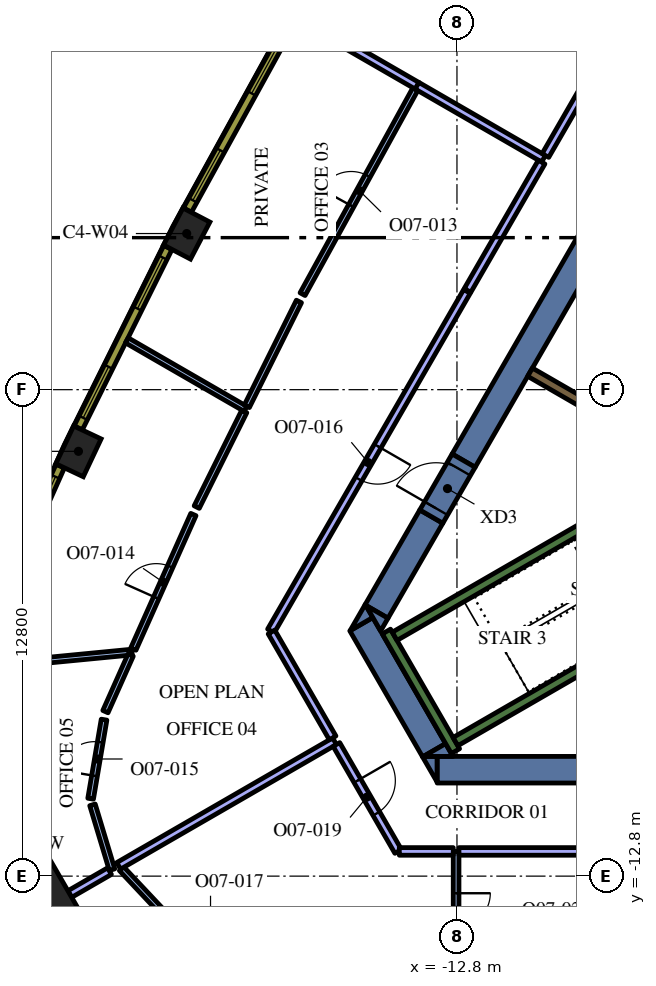
"""IFC4 building model, lengths in metres.
Left out: names, types, materials, properties, quantities, classifications, styles, units other than length and angle.
Written with IfcOpenShell. Run it as: python <this file> out.ifc"""

import sys

from ifc_helpers import new_model, si_unit, direction, frame, frame_2d, origin, origin_2d, place, context, subcontext, project, spatial, polyline, rectangle, outline, extrude, element, fill, save


model = new_model("IFC4")
c1 = context("Model", 3, precision=1e-05, world=origin(), true_north=direction((0.0, 1.0)))
c2 = subcontext(c1, "Body", "Model", "MODEL_VIEW")
j1 = project(units=[si_unit("LENGTHUNIT", "METRE"), si_unit("PLANEANGLEUNIT", "RADIAN")], contexts=[c1])
p1 = place(None, origin())
s1 = spatial("IfcSite", under=j1, at=p1, CompositionType="ELEMENT")
p2 = place(p1, origin())
s2 = spatial("IfcBuilding", under=s1, at=p2, CompositionType="ELEMENT")
p3 = place(p2, frame((0.0, 0.0, 218.4)))
s3 = spatial("IfcBuildingStorey", under=s2, at=p3, CompositionType="ELEMENT", Elevation=218.4)
p4 = place(p3, frame((-24.027, -13.872, 0.0), z_axis=(0.0, 0.0, 1.0), x_axis=(-0.866025403784, -0.5, 0.0)))
e1 = element("IfcColumn", 1, at=p4, inside=s3, PredefinedType="COLUMN", context=c2, shape_type="SweptSolid", body=[
    extrude(rectangle(XDim=2.4, YDim=2.4, at=origin_2d()), origin(), (0.0, 0.0, 1.0), 4.2),
])
for number, where, z_axis, x_axis in (
    (2, (-19.912, 4.108, 0.0), (0.0, 0.0, 1.0), (-0.464, -0.886, 0.0)),
    (3, (-22.76, -1.623, 0.0), (0.0, 0.0, 1.0), (-0.426, -0.905, 0.0)),
):
    element("IfcColumn", number, at=place(p3, frame(where, z_axis=z_axis, x_axis=x_axis)), inside=s3, PredefinedType="COLUMN", context=c2, shape_type="SweptSolid", body=[
        extrude(rectangle(XDim=1.1, YDim=0.8, at=origin_2d()), origin(), (0.0, 0.0, 1.0), 4.2),
    ])
p5 = place(p3, frame((8.904, -10.0, 0.0), z_axis=(0.0, 0.0, 1.0), x_axis=(-1.0, 0.0, 0.0)))
e4 = element("IfcWall", 4, at=p5, inside=s3, PredefinedType="SOLIDWALL", context=c2, shape_type="SweptSolid", body=[
    extrude(rectangle(XDim=22.226, YDim=0.7, at=frame_2d((11.113, 0.0))), origin(), (0.0, 0.0, 1.0), 4.2),
])
p6 = place(p3, origin())
e5 = element("IfcWall", 5, at=p6, inside=s3, PredefinedType="SOLIDWALL", context=c2, shape_type="SweptSolid", body=[
    extrude(outline(polyline([(-13.712, -9.65), (-13.324, -9.65), (-13.324, -10.322), (-13.712, -9.65)])), origin(), (0.0, 0.0, 1.0), 4.2),
])
p7 = place(p3, frame((-13.402, -9.487, 0.0), z_axis=(0.0, 0.0, 1.0), x_axis=(-0.500020498207, 0.866013568815, 0.0)))
e6 = element("IfcWall", 6, at=p7, inside=s3, PredefinedType="SOLIDWALL", context=c2, shape_type="SweptSolid", body=[
    extrude(rectangle(XDim=3.829, YDim=0.7, at=frame_2d((1.915, 0.0))), origin(), (0.0, 0.0, 1.0), 4.2),
])
e7 = element("IfcWall", 7, at=p6, inside=s3, PredefinedType="SOLIDWALL", context=c2, shape_type="SweptSolid", body=[
    extrude(outline(polyline([(-15.014, -5.995), (-15.611, -6.339), (-15.213, -5.65), (-15.014, -5.995)])), origin(), (0.0, 0.0, 1.0), 4.2),
])
e8 = element("IfcWall", 8, at=p6, inside=s3, PredefinedType="SOLIDWALL", context=c2, shape_type="SweptSolid", body=[
    extrude(outline(polyline([(-12.904, -9.65), (-13.68, -9.65), (-13.098, -9.314), (-12.904, -9.65)])), origin(), (0.0, 0.0, 1.0), 4.2),
])
p8 = place(p3, frame((-13.475, -3.339, 0.0), z_axis=(0.0, 0.0, 1.0), x_axis=(-0.499944726303, -0.866057313716, 0.0)))
e9 = element("IfcWall", 9, at=p8, inside=s3, PredefinedType="SOLIDWALL", context=c2, shape_type="SweptSolid", body=[
    extrude(rectangle(XDim=2.884, YDim=0.7, at=frame_2d((1.442, 0.0))), origin(), (0.0, 0.0, 1.0), 4.2),
])
e10 = element("IfcWall", 10, at=p6, inside=s3, PredefinedType="SOLIDWALL", context=c2, shape_type="SweptSolid", body=[
    extrude(outline(polyline([(-14.809, -6.35), (-15.197, -5.678), (-14.615, -6.014), (-14.809, -6.35)])), origin(), (0.0, 0.0, 1.0), 4.2),
])
p9 = place(p3, frame((-12.625, -1.867, 0.0), z_axis=(0.0, 0.0, 1.0), x_axis=(0.500008520515, 0.866020484407, 0.0)))
e11 = element("IfcWall", 11, at=p9, inside=s3, PredefinedType="SOLIDWALL", context=c2, shape_type="SweptSolid", body=[
    extrude(rectangle(XDim=15.859, YDim=0.7, at=frame_2d((7.929, 0.0))), origin(), (0.0, 0.0, 1.0), 4.2),
])
p10 = place(p3, frame((-12.84, -9.511, 0.0), z_axis=(0.0, 0.0, 1.0), x_axis=(-0.499997733992, 0.866026712061, 0.0)))
e12 = element("IfcWall", 12, at=p10, inside=s3, PredefinedType="SOLIDWALL", context=c2, shape_type="SweptSolid", body=[
    extrude(rectangle(XDim=3.634, YDim=0.25, at=frame_2d((1.817, 0.0))), origin(), (0.0, 0.0, 1.0), 4.2),
])
p11 = place(p3, frame((-14.44, -6.49, 0.0), z_axis=(0.0, 0.0, 1.0), x_axis=(0.866022966069, 0.500004222222, 0.0)))
e13 = element("IfcWall", 13, at=p11, inside=s3, PredefinedType="SOLIDWALL", context=c2, shape_type="SweptSolid", body=[
    extrude(rectangle(XDim=6.8, YDim=0.25, at=frame_2d((3.4, 0.0))), origin(), (0.0, 0.0, 1.0), 4.2),
])
p12 = place(p3, frame((-12.84, -9.261, 0.0), z_axis=(0.0, 0.0, 1.0), x_axis=(0.866016039709, 0.500016218704, 0.0)))
e14 = element("IfcWall", 14, at=p12, inside=s3, PredefinedType="SOLIDWALL", context=c2, shape_type="SweptSolid", body=[
    extrude(rectangle(XDim=7.05, YDim=0.25, at=frame_2d((3.525, 0.0))), origin(), (0.0, 0.0, 1.0), 4.2),
])
p13 = place(p3, frame((-8.106, -1.14, 0.0), z_axis=(0.0, 0.0, 1.0), x_axis=(-0.866008981251, 0.500028443584, 0.0)))
e15 = element("IfcWall", 15, at=p13, inside=s3, PredefinedType="SOLIDWALL", context=c2, shape_type="SweptSolid", body=[
    extrude(rectangle(XDim=3.2, YDim=0.25, at=frame_2d((1.6, 0.0))), origin(), (0.0, 0.0, 1.0), 4.2),
])
p14 = place(p3, frame((-13.475, -3.339, 0.0), z_axis=(0.0, 0.0, 1.0), x_axis=(0.499954529098, 0.86605165483, 0.0)))
e16 = element("IfcWall", 16, at=p14, inside=s3, PredefinedType="SOLIDWALL", context=c2, shape_type="SweptSolid", body=[
    extrude(rectangle(XDim=1.7, YDim=0.7, at=frame_2d((0.85, 0.0))), origin(), (0.0, 0.0, 1.0), 4.2),
])
p15 = place(p14, frame((0.25, 0.0, 0.0)))
e17 = element("IfcOpeningElement", 17, at=p15, cuts=e16, PredefinedType="OPENING", context=c2, shape_type="SweptSolid", body=[
    extrude(rectangle(XDim=1.2, YDim=2.1, at=frame_2d((0.6, 1.05))), frame((0.0, 0.36, 0.0), z_axis=(0.0, -1.0, 0.0), x_axis=(1.0, 0.0, 0.0)), (0.0, 0.0, 1.0), 0.72),
])
p16 = place(p3, frame((-13.844, 7.993, 0.0), z_axis=(0.0, 0.0, 1.0), x_axis=(-0.866003976688, 0.500037110984, 0.0)))
e18 = element("IfcWall", 18, at=p16, inside=s3, PredefinedType="PARTITIONING", context=c2, shape_type="SweptSolid", body=[
    extrude(rectangle(XDim=3.045, YDim=0.2, at=frame_2d((1.522, 0.0))), origin(), (0.0, 0.0, 1.0), 3.45),
])
p17 = place(p3, frame((-10.522, 6.075, 0.0), z_axis=(0.0, 0.0, 1.0), x_axis=(-0.866002601515, 0.500039492609, 0.0)))
e19 = element("IfcWall", 19, at=p17, inside=s3, PredefinedType="PARTITIONING", context=c2, shape_type="SweptSolid", body=[
    extrude(rectangle(XDim=3.844, YDim=0.2, at=frame_2d((1.922, 0.0))), origin(), (0.0, 0.0, 1.0), 3.45),
])
p18 = place(p3, frame((-8.522, 9.539, 0.0), z_axis=(0.0, 0.0, 1.0), x_axis=(-0.499997012787, -0.866027128446, 0.0)))
e20 = element("IfcWall", 20, at=p18, inside=s3, PredefinedType="PARTITIONING", context=c2, shape_type="SweptSolid", body=[
    extrude(rectangle(XDim=3.9, YDim=0.2, at=frame_2d((1.95, 0.0))), origin(), (0.0, 0.0, 1.0), 3.45),
])
p19 = place(p3, frame((-18.363, -0.506, 0.0), z_axis=(0.0, 0.0, 1.0), x_axis=(-0.866048087663, 0.499960708312, 0.0)))
e21 = element("IfcWall", 21, at=p19, inside=s3, PredefinedType="PARTITIONING", context=c2, shape_type="SweptSolid", body=[
    extrude(rectangle(XDim=3.607, YDim=0.15, at=frame_2d((1.804, 0.0))), origin(), (0.0, 0.0, 1.0), 3.45),
])
p20 = place(p3, frame((-16.863, 2.513, 0.0), z_axis=(0.0, 0.0, 1.0), x_axis=(0.48192483879, 0.876212559689, 0.0)))
e22 = element("IfcWall", 22, at=p20, inside=s3, PredefinedType="PARTITIONING", context=c2, shape_type="SweptSolid", body=[
    extrude(rectangle(XDim=6.157, YDim=0.15, at=frame_2d((3.078, 0.0))), origin(), (0.0, 0.0, 1.0), 3.45),
])
p21 = place(p20, frame((2.657, 0.0, 0.0)))
e23 = element("IfcOpeningElement", 23, at=p21, cuts=e22, PredefinedType="OPENING", context=c2, shape_type="SweptSolid", body=[
    extrude(rectangle(XDim=0.9, YDim=2.1, at=frame_2d((0.45, 1.05))), frame((0.0, 0.085, 0.0), z_axis=(0.0, -1.0, 0.0), x_axis=(1.0, 0.0, 0.0)), (0.0, 0.0, 1.0), 0.17),
])
p22 = place(p3, frame((-16.958, 2.321, 0.0), z_axis=(0.0, 0.0, 1.0), x_axis=(-0.445184199442, -0.895439014432, 0.0)))
e24 = element("IfcWall", 24, at=p22, inside=s3, PredefinedType="PARTITIONING", context=c2, shape_type="SweptSolid", body=[
    extrude(rectangle(XDim=3.082, YDim=0.15, at=frame_2d((1.541, 0.0))), origin(), (0.0, 0.0, 1.0), 3.45),
])
p23 = place(p3, frame((-21.351, -6.904, 0.0), z_axis=(0.0, 0.0, 1.0), x_axis=(-0.995356631468, -0.096255785242, 0.0)))
e25 = element("IfcWall", 25, at=p23, inside=s3, PredefinedType="PARTITIONING", context=c2, shape_type="SweptSolid", body=[
    extrude(rectangle(XDim=3.536, YDim=0.15, at=frame_2d((1.768, 0.0))), origin(), (0.0, 0.0, 1.0), 3.45),
])
p24 = place(p3, frame((-18.397, -0.573, 0.0), z_axis=(0.0, 0.0, 1.0), x_axis=(-0.445162501923, -0.89544980143, 0.0)))
e26 = element("IfcWall", 26, at=p24, inside=s3, PredefinedType="PARTITIONING", context=c2, shape_type="SweptSolid", body=[
    extrude(rectangle(XDim=2.811, YDim=0.15, at=frame_2d((1.405, 0.0))), origin(), (0.0, 0.0, 1.0), 3.45),
])
p25 = place(p3, frame((-21.316, -6.826, 0.0), z_axis=(0.0, 0.0, 1.0), x_axis=(0.407639588163, 0.913142905663, 0.0)))
e27 = element("IfcWall", 27, at=p25, inside=s3, PredefinedType="PARTITIONING", context=c2, shape_type="SweptSolid", body=[
    extrude(rectangle(XDim=3.877, YDim=0.15, at=frame_2d((1.938, 0.0))), origin(), (0.0, 0.0, 1.0), 3.45),
])
p26 = place(p25, frame((1.477, 0.0, 0.0)))
e28 = element("IfcOpeningElement", 28, at=p26, cuts=e27, PredefinedType="OPENING", context=c2, shape_type="SweptSolid", body=[
    extrude(rectangle(XDim=0.9, YDim=2.1, at=frame_2d((0.45, 1.05))), frame((0.0, 0.085, 0.0), z_axis=(0.0, -1.0, 0.0), x_axis=(1.0, 0.0, 0.0)), (0.0, 0.0, 1.0), 0.17),
])
p27 = place(p3, frame((-21.386, -6.983, 0.0), z_axis=(0.0, 0.0, 1.0), x_axis=(-0.407597309494, -0.91316177827, 0.0)))
e29 = element("IfcWall", 29, at=p27, inside=s3, PredefinedType="PARTITIONING", context=c2, shape_type="SweptSolid", body=[
    extrude(rectangle(XDim=1.63, YDim=0.15, at=frame_2d((0.815, 0.0))), origin(), (0.0, 0.0, 1.0), 3.45),
])
p28 = place(p3, frame((-22.44, -10.763, 0.0), z_axis=(0.0, 0.0, 1.0), x_axis=(0.167682096872, 0.985841120257, 0.0)))
e30 = element("IfcWall", 30, at=p28, inside=s3, PredefinedType="PARTITIONING", context=c2, shape_type="SweptSolid", body=[
    extrude(rectangle(XDim=2.11, YDim=0.15, at=frame_2d((1.055, 0.0))), origin(), (0.0, 0.0, 1.0), 3.45),
])
p29 = place(p28, frame((0.61, 0.0, 0.0)))
e31 = element("IfcOpeningElement", 31, at=p29, cuts=e30, PredefinedType="OPENING", context=c2, shape_type="SweptSolid", body=[
    extrude(rectangle(XDim=0.9, YDim=2.1, at=frame_2d((0.45, 1.05))), frame((0.0, 0.085, 0.0), z_axis=(0.0, -1.0, 0.0), x_axis=(1.0, 0.0, 0.0)), (0.0, 0.0, 1.0), 0.17),
])
p30 = place(p3, frame((-22.391, -10.924, 0.0), z_axis=(0.0, 0.0, 1.0), x_axis=(0.288642134652, -0.957437056993, 0.0)))
e32 = element("IfcWall", 32, at=p30, inside=s3, PredefinedType="PARTITIONING", context=c2, shape_type="SweptSolid", body=[
    extrude(rectangle(XDim=1.782, YDim=0.15, at=frame_2d((0.891, 0.0))), origin(), (0.0, 0.0, 1.0), 3.45),
])
p31 = place(p3, frame((-21.943, -12.669, 0.0), z_axis=(0.0, 0.0, 1.0), x_axis=(-0.866030586491, -0.499991023182, 0.0)))
e33 = element("IfcWall", 33, at=p31, inside=s3, PredefinedType="PARTITIONING", context=c2, shape_type="SweptSolid", body=[
    extrude(rectangle(XDim=1.207, YDim=0.2, at=frame_2d((0.603, 0.0))), origin(), (0.0, 0.0, 1.0), 3.45),
])
p32 = place(p3, frame((-16.021, -9.25, 0.0), z_axis=(0.0, 0.0, 1.0), x_axis=(-0.866021955858, -0.500005971936, 0.0)))
e34 = element("IfcWall", 34, at=p32, inside=s3, PredefinedType="PARTITIONING", context=c2, shape_type="SweptSolid", body=[
    extrude(rectangle(XDim=6.56, YDim=0.2, at=frame_2d((3.28, 0.0))), origin(), (0.0, 0.0, 1.0), 3.45),
])
p33 = place(p3, frame((-10.572, 5.988, 0.0), z_axis=(0.0, 0.0, 1.0), x_axis=(-0.499997012787, -0.866027128446, 0.0)))
e35 = element("IfcWall", 35, at=p33, inside=s3, PredefinedType="PARTITIONING", context=c2, shape_type="SweptSolid", body=[
    extrude(rectangle(XDim=3.9, YDim=0.2, at=frame_2d((1.95, 0.0))), origin(), (0.0, 0.0, 1.0), 3.45),
])
p34 = place(p3, frame((-12.537, 2.585, 0.0), z_axis=(0.0, 0.0, 1.0), x_axis=(-0.500002393198, -0.866024022066, 0.0)))
e36 = element("IfcWall", 36, at=p34, inside=s3, PredefinedType="PARTITIONING", context=c2, shape_type="SweptSolid", body=[
    extrude(rectangle(XDim=10.317, YDim=0.2, at=frame_2d((5.159, 0.0))), origin(), (0.0, 0.0, 1.0), 3.45),
])
p35 = place(p34, frame((4.7, 0.0, 0.0)))
e37 = element("IfcOpeningElement", 37, at=p35, cuts=e36, PredefinedType="OPENING", context=c2, shape_type="SweptSolid", body=[
    extrude(rectangle(XDim=1.0, YDim=2.1, at=frame_2d((0.5, 1.05))), frame((0.0, 0.11, 0.0), z_axis=(0.0, -1.0, 0.0), x_axis=(1.0, 0.0, 0.0)), (0.0, 0.0, 1.0), 0.22),
])
p36 = place(p3, frame((-17.681, -6.376, 0.0), z_axis=(0.0, 0.0, 1.0), x_axis=(0.500022299258, -0.866012528919, 0.0)))
e38 = element("IfcWall", 38, at=p36, inside=s3, PredefinedType="PARTITIONING", context=c2, shape_type="SweptSolid", body=[
    extrude(rectangle(XDim=3.219, YDim=0.2, at=frame_2d((1.609, 0.0))), origin(), (0.0, 0.0, 1.0), 3.45),
])
p37 = place(p3, frame((-21.628, -12.603, 0.0), z_axis=(0.0, 0.0, 1.0), x_axis=(0.684778496912, -0.728751267695, 0.0)))
e39 = element("IfcWall", 39, at=p37, inside=s3, PredefinedType="PARTITIONING", context=c2, shape_type="SweptSolid", body=[
    extrude(rectangle(XDim=1.754, YDim=0.15, at=frame_2d((0.877, 0.0))), origin(), (0.0, 0.0, 1.0), 3.45),
])
p38 = place(p3, frame((-12.823, -12.15, 0.0), z_axis=(0.0, 0.0, 1.0), x_axis=(0.0, -1.0, 0.0)))
e40 = element("IfcWall", 40, at=p38, inside=s3, PredefinedType="PARTITIONING", context=c2, shape_type="SweptSolid", body=[
    extrude(rectangle(XDim=3.011, YDim=0.15, at=frame_2d((1.505, 0.0))), origin(), (0.0, 0.0, 1.0), 3.45),
])
p39 = place(p38, frame((1.1, 0.0, 0.0)))
e41 = element("IfcOpeningElement", 41, at=p39, cuts=e40, PredefinedType="OPENING", context=c2, shape_type="SweptSolid", body=[
    extrude(rectangle(XDim=0.9, YDim=2.1, at=frame_2d((0.45, 1.05))), frame((0.0, 0.085, 0.0), z_axis=(0.0, -1.0, 0.0), x_axis=(1.0, 0.0, 0.0)), (0.0, 0.0, 1.0), 0.17),
])
p40 = place(p3, frame((-15.971, -9.337, 0.0), z_axis=(0.0, 0.0, 1.0), x_axis=(0.500010870188, -0.866019127788, 0.0)))
e42 = element("IfcWall", 42, at=p40, inside=s3, PredefinedType="PARTITIONING", context=c2, shape_type="SweptSolid", body=[
    extrude(rectangle(XDim=3.249, YDim=0.2, at=frame_2d((1.624, 0.0))), origin(), (0.0, 0.0, 1.0), 3.45),
])
p41 = place(p40, frame((1.1, 0.0, 0.0)))
e43 = element("IfcOpeningElement", 43, at=p41, cuts=e42, PredefinedType="OPENING", context=c2, shape_type="SweptSolid", body=[
    extrude(rectangle(XDim=1.0, YDim=2.1, at=frame_2d((0.5, 1.05))), frame((0.0, 0.11, 0.0), z_axis=(0.0, -1.0, 0.0), x_axis=(1.0, 0.0, 0.0)), (0.0, 0.0, 1.0), 0.22),
])
p42 = place(p3, frame((-14.317, -12.15, 0.0), z_axis=(0.0, 0.0, 1.0), x_axis=(1.0, 0.0, 0.0)))
e44 = element("IfcWall", 44, at=p42, inside=s3, PredefinedType="PARTITIONING", context=c2, shape_type="SweptSolid", body=[
    extrude(rectangle(XDim=1.419, YDim=0.2, at=frame_2d((0.71, 0.0))), origin(), (0.0, 0.0, 1.0), 3.45),
])
p43 = place(p3, frame((-12.748, -12.15, 0.0), z_axis=(0.0, 0.0, 1.0), x_axis=(1.0, 0.0, 0.0)))
e45 = element("IfcWall", 45, at=p43, inside=s3, PredefinedType="PARTITIONING", context=c2, shape_type="SweptSolid", body=[
    extrude(rectangle(XDim=8.718, YDim=0.2, at=frame_2d((4.359, 0.0))), origin(), (0.0, 0.0, 1.0), 3.45),
])
p44 = place(p3, frame((-17.338, 9.368, 0.0), z_axis=(0.0, 0.0, 1.0), x_axis=(-0.481925825015, -0.876212017256, 0.0)))
e46 = element("IfcWall", 46, at=p44, inside=s3, PredefinedType="SOLIDWALL", context=c2, shape_type="SweptSolid", body=[
    extrude(rectangle(XDim=5.299, YDim=0.24, at=frame_2d((2.649, 0.0))), origin(), (0.0, 0.0, 1.0), 3.95),
])
p45 = place(p44, frame((0.295, 0.0, 0.9)))
e47 = element("IfcOpeningElement", 47, at=p45, cuts=e46, PredefinedType="OPENING", context=c2, shape_type="SweptSolid", body=[
    extrude(rectangle(XDim=1.5, YDim=2.55, at=frame_2d((0.75, 1.275))), frame((0.0, 0.13, 0.0), z_axis=(0.0, -1.0, 0.0), x_axis=(1.0, 0.0, 0.0)), (0.0, 0.0, 1.0), 0.26),
])
p46 = place(p44, frame((3.504, 0.0, 0.9)))
e48 = element("IfcOpeningElement", 48, at=p46, cuts=e46, PredefinedType="OPENING", context=c2, shape_type="SweptSolid", body=[
    extrude(rectangle(XDim=1.5, YDim=2.55, at=frame_2d((0.75, 1.275))), frame((0.0, 0.13, 0.0), z_axis=(0.0, -1.0, 0.0), x_axis=(1.0, 0.0, 0.0)), (0.0, 0.0, 1.0), 0.26),
])
p47 = place(p3, frame((-20.407, 3.74, 0.0), z_axis=(0.0, 0.0, 1.0), x_axis=(-0.445129582031, -0.895466166419, 0.0)))
e49 = element("IfcWall", 49, at=p47, inside=s3, PredefinedType="SOLIDWALL", context=c2, shape_type="SweptSolid", body=[
    extrude(rectangle(XDim=5.298, YDim=0.24, at=frame_2d((2.649, 0.0))), origin(), (0.0, 0.0, 1.0), 3.95),
])
p48 = place(p47, frame((0.295, 0.0, 0.9)))
e50 = element("IfcOpeningElement", 50, at=p48, cuts=e49, PredefinedType="OPENING", context=c2, shape_type="SweptSolid", body=[
    extrude(rectangle(XDim=1.5, YDim=2.55, at=frame_2d((0.75, 1.275))), frame((0.0, 0.13, 0.0), z_axis=(0.0, -1.0, 0.0), x_axis=(1.0, 0.0, 0.0)), (0.0, 0.0, 1.0), 0.26),
])
p49 = place(p47, frame((3.504, 0.0, 0.9)))
e51 = element("IfcOpeningElement", 51, at=p49, cuts=e49, PredefinedType="OPENING", context=c2, shape_type="SweptSolid", body=[
    extrude(rectangle(XDim=1.5, YDim=2.55, at=frame_2d((0.75, 1.275))), frame((0.0, 0.13, 0.0), z_axis=(0.0, -1.0, 0.0), x_axis=(1.0, 0.0, 0.0)), (0.0, 0.0, 1.0), 0.26),
])
p50 = place(p3, frame((-23.24, -2.011, 0.0), z_axis=(0.0, 0.0, 1.0), x_axis=(-0.407579651789, -0.913169659728, 0.0)))
e52 = element("IfcWall", 52, at=p50, inside=s3, PredefinedType="SOLIDWALL", context=c2, shape_type="SweptSolid", body=[
    extrude(rectangle(XDim=5.311, YDim=0.24, at=frame_2d((2.655, 0.0))), origin(), (0.0, 0.0, 1.0), 3.95),
])
p51 = place(p50, frame((0.306, 0.0, 0.9)))
e53 = element("IfcOpeningElement", 53, at=p51, cuts=e52, PredefinedType="OPENING", context=c2, shape_type="SweptSolid", body=[
    extrude(rectangle(XDim=1.5, YDim=2.55, at=frame_2d((0.75, 1.275))), frame((0.0, 0.13, 0.0), z_axis=(0.0, -1.0, 0.0), x_axis=(1.0, 0.0, 0.0)), (0.0, 0.0, 1.0), 0.26),
])
p52 = place(p50, frame((3.539, 0.0, 0.9)))
e54 = element("IfcOpeningElement", 54, at=p52, cuts=e52, PredefinedType="OPENING", context=c2, shape_type="SweptSolid", body=[
    extrude(rectangle(XDim=1.5, YDim=2.55, at=frame_2d((0.75, 1.275))), frame((0.0, 0.13, 0.0), z_axis=(0.0, -1.0, 0.0), x_axis=(1.0, 0.0, 0.0)), (0.0, 0.0, 1.0), 0.26),
])
p53 = place(p15, origin())
e55 = element("IfcDoor", 55, at=p53, inside=s3, OperationType="SINGLE_SWING_LEFT", PredefinedType="DOOR", context=c2, shape_type="SweptSolid", body=[
    extrude(rectangle(XDim=1.2, YDim=2.1, at=frame_2d((0.6, 1.05))), frame((0.0, 0.025, 0.0), z_axis=(0.0, -1.0, 0.0), x_axis=(1.0, 0.0, 0.0)), (0.0, 0.0, 1.0), 0.05),
])
fill(e17, e55)
p54 = place(p21, origin())
e56 = element("IfcDoor", 56, at=p54, inside=s3, OperationType="SINGLE_SWING_RIGHT", PredefinedType="DOOR", context=c2, shape_type="SweptSolid", body=[
    extrude(rectangle(XDim=0.9, YDim=2.1, at=frame_2d((0.45, 1.05))), frame((0.0, 0.025, 0.0), z_axis=(0.0, -1.0, 0.0), x_axis=(1.0, 0.0, 0.0)), (0.0, 0.0, 1.0), 0.05),
])
fill(e23, e56)
p55 = place(p26, origin())
e57 = element("IfcDoor", 57, at=p55, inside=s3, OperationType="SINGLE_SWING_LEFT", PredefinedType="DOOR", context=c2, shape_type="SweptSolid", body=[
    extrude(rectangle(XDim=0.9, YDim=2.1, at=frame_2d((0.45, 1.05))), frame((0.0, 0.025, 0.0), z_axis=(0.0, -1.0, 0.0), x_axis=(1.0, 0.0, 0.0)), (0.0, 0.0, 1.0), 0.05),
])
fill(e28, e57)
p56 = place(p29, origin())
e58 = element("IfcDoor", 58, at=p56, inside=s3, OperationType="SINGLE_SWING_RIGHT", PredefinedType="DOOR", context=c2, shape_type="SweptSolid", body=[
    extrude(rectangle(XDim=0.9, YDim=2.1, at=frame_2d((0.45, 1.05))), frame((0.0, 0.025, 0.0), z_axis=(0.0, -1.0, 0.0), x_axis=(1.0, 0.0, 0.0)), (0.0, 0.0, 1.0), 0.05),
])
fill(e31, e58)
p57 = place(p35, origin())
e59 = element("IfcDoor", 59, at=p57, inside=s3, OperationType="SINGLE_SWING_RIGHT", PredefinedType="DOOR", context=c2, shape_type="SweptSolid", body=[
    extrude(rectangle(XDim=1.0, YDim=2.1, at=frame_2d((0.5, 1.05))), frame((0.0, 0.025, 0.0), z_axis=(0.0, -1.0, 0.0), x_axis=(1.0, 0.0, 0.0)), (0.0, 0.0, 1.0), 0.05),
])
fill(e37, e59)
p58 = place(p41, origin())
e60 = element("IfcDoor", 60, at=p58, inside=s3, OperationType="SINGLE_SWING_LEFT", PredefinedType="DOOR", context=c2, shape_type="SweptSolid", body=[
    extrude(rectangle(XDim=1.0, YDim=2.1, at=frame_2d((0.5, 1.05))), frame((0.0, 0.025, 0.0), z_axis=(0.0, -1.0, 0.0), x_axis=(1.0, 0.0, 0.0)), (0.0, 0.0, 1.0), 0.05),
])
fill(e43, e60)
p59 = place(p39, origin())
e61 = element("IfcDoor", 61, at=p59, inside=s3, OperationType="SINGLE_SWING_RIGHT", PredefinedType="DOOR", context=c2, shape_type="SweptSolid", body=[
    extrude(rectangle(XDim=0.9, YDim=2.1, at=frame_2d((0.45, 1.05))), frame((0.0, 0.025, 0.0), z_axis=(0.0, -1.0, 0.0), x_axis=(1.0, 0.0, 0.0)), (0.0, 0.0, 1.0), 0.05),
])
fill(e41, e61)
p60 = place(p45, origin())
e62 = element("IfcWindow", 62, at=p60, inside=s3, PartitioningType="SINGLE_PANEL", PredefinedType="WINDOW", context=c2, shape_type="SweptSolid", body=[
    extrude(rectangle(XDim=1.5, YDim=2.55, at=frame_2d((0.75, 1.275))), frame((0.0, 0.04, 0.0), z_axis=(0.0, -1.0, 0.0), x_axis=(1.0, 0.0, 0.0)), (0.0, 0.0, 1.0), 0.06),
])
fill(e47, e62)
p61 = place(p46, origin())
e63 = element("IfcWindow", 63, at=p61, inside=s3, PartitioningType="SINGLE_PANEL", PredefinedType="WINDOW", context=c2, shape_type="SweptSolid", body=[
    extrude(rectangle(XDim=1.5, YDim=2.55, at=frame_2d((0.75, 1.275))), frame((0.0, 0.04, 0.0), z_axis=(0.0, -1.0, 0.0), x_axis=(1.0, 0.0, 0.0)), (0.0, 0.0, 1.0), 0.06),
])
fill(e48, e63)
p62 = place(p48, origin())
e64 = element("IfcWindow", 64, at=p62, inside=s3, PartitioningType="SINGLE_PANEL", PredefinedType="WINDOW", context=c2, shape_type="SweptSolid", body=[
    extrude(rectangle(XDim=1.5, YDim=2.55, at=frame_2d((0.75, 1.275))), frame((0.0, 0.04, 0.0), z_axis=(0.0, -1.0, 0.0), x_axis=(1.0, 0.0, 0.0)), (0.0, 0.0, 1.0), 0.06),
])
fill(e50, e64)
p63 = place(p49, origin())
e65 = element("IfcWindow", 65, at=p63, inside=s3, PartitioningType="SINGLE_PANEL", PredefinedType="WINDOW", context=c2, shape_type="SweptSolid", body=[
    extrude(rectangle(XDim=1.5, YDim=2.55, at=frame_2d((0.75, 1.275))), frame((0.0, 0.04, 0.0), z_axis=(0.0, -1.0, 0.0), x_axis=(1.0, 0.0, 0.0)), (0.0, 0.0, 1.0), 0.06),
])
fill(e51, e65)
p64 = place(p51, origin())
e66 = element("IfcWindow", 66, at=p64, inside=s3, PartitioningType="SINGLE_PANEL", PredefinedType="WINDOW", context=c2, shape_type="SweptSolid", body=[
    extrude(rectangle(XDim=1.5, YDim=2.55, at=frame_2d((0.75, 1.275))), frame((0.0, 0.04, 0.0), z_axis=(0.0, -1.0, 0.0), x_axis=(1.0, 0.0, 0.0)), (0.0, 0.0, 1.0), 0.06),
])
fill(e53, e66)
save(model, sys.argv[1])
